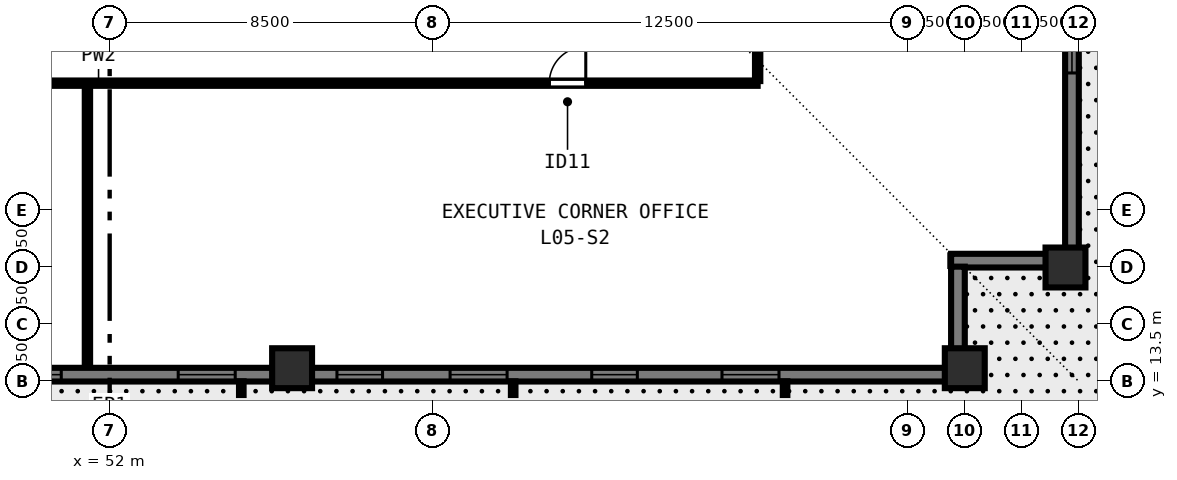
"""IFC4 building model, lengths in metres.
Left out: names, types, materials, properties, quantities, classifications, styles, units other than length and angle.
Written with IfcOpenShell. Run it as: python <this file> out.ifc"""

import sys

from ifc_helpers import new_model, si_unit, direction, frame, frame_2d, origin, origin_2d, place, context, subcontext, project, spatial, rectangle, extrude, element, fill, save


model = new_model("IFC4")
c1 = context("Model", 3, precision=1e-05, world=origin(), true_north=direction((0.0, 1.0)))
c2 = subcontext(c1, "Body", "Model", "MODEL_VIEW")
j1 = project(units=[si_unit("LENGTHUNIT", "METRE"), si_unit("PLANEANGLEUNIT", "RADIAN")], contexts=[c1])
p1 = place(None, origin())
s1 = spatial("IfcSite", under=j1, at=p1, CompositionType="ELEMENT")
p2 = place(p1, origin())
s2 = spatial("IfcBuilding", under=s1, at=p2, CompositionType="ELEMENT")
p3 = place(p2, frame((0.0, 0.0, 23.5)))
s3 = spatial("IfcBuildingStorey", under=s2, at=p3, CompositionType="ELEMENT", Elevation=23.5)
for number, where, z_axis, x_axis in (
    (1, (56.8, 13.85, 0.0), (0.0, 0.0, 1.0), (1.0, 0.0, 0.0)),
    (2, (74.5, 13.85, 0.0), (0.0, 0.0, 1.0), (1.0, 0.0, 0.0)),
    (3, (77.15, 16.5, 0.0), (0.0, 0.0, 1.0), (0.0, 1.0, 0.0)),
):
    element("IfcColumn", number, at=place(p3, frame(where, z_axis=z_axis, x_axis=x_axis)), inside=s3, PredefinedType="COLUMN", context=c2, shape_type="SweptSolid", body=[
        extrude(rectangle(XDim=1.05, YDim=1.05, at=origin_2d()), origin(), (0.0, 0.0, 1.0), 3.5),
    ])
p4 = place(p3, frame((77.32, 61.5, 0.0), z_axis=(0.0, 0.0, 1.0), x_axis=(0.0, -1.0, 0.0)))
e4 = element("IfcWall", 4, at=p4, inside=s3, PredefinedType="SOLIDWALL", context=c2, shape_type="SweptSolid", body=[
    extrude(rectangle(XDim=44.662, YDim=0.36, at=frame_2d((22.331, 0.0))), origin(), (0.0, 0.0, 1.0), 3.28),
])
p5 = place(p4, frame((4.78, 0.0, 0.8)))
e5 = element("IfcOpeningElement", 5, at=p5, cuts=e4, PredefinedType="OPENING", context=c2, shape_type="SweptSolid", body=[
    extrude(rectangle(XDim=1.5, YDim=1.544, at=frame_2d((0.75, 0.772))), frame((0.0, 0.19, 0.0), z_axis=(0.0, -1.0, 0.0), x_axis=(1.0, 0.0, 0.0)), (0.0, 0.0, 1.0), 0.38),
])
p6 = place(p4, frame((8.29, 0.0, 0.8)))
e6 = element("IfcOpeningElement", 6, at=p6, cuts=e4, PredefinedType="OPENING", context=c2, shape_type="SweptSolid", body=[
    extrude(rectangle(XDim=1.2, YDim=1.544, at=frame_2d((0.6, 0.772))), frame((0.0, 0.19, 0.0), z_axis=(0.0, -1.0, 0.0), x_axis=(1.0, 0.0, 0.0)), (0.0, 0.0, 1.0), 0.38),
])
p7 = place(p4, frame((11.5, 0.0, 0.8)))
e7 = element("IfcOpeningElement", 7, at=p7, cuts=e4, PredefinedType="OPENING", context=c2, shape_type="SweptSolid", body=[
    extrude(rectangle(XDim=1.5, YDim=1.544, at=frame_2d((0.75, 0.772))), frame((0.0, 0.19, 0.0), z_axis=(0.0, -1.0, 0.0), x_axis=(1.0, 0.0, 0.0)), (0.0, 0.0, 1.0), 0.38),
])
p8 = place(p4, frame((15.01, 0.0, 0.8)))
e8 = element("IfcOpeningElement", 8, at=p8, cuts=e4, PredefinedType="OPENING", context=c2, shape_type="SweptSolid", body=[
    extrude(rectangle(XDim=1.2, YDim=1.544, at=frame_2d((0.6, 0.772))), frame((0.0, 0.19, 0.0), z_axis=(0.0, -1.0, 0.0), x_axis=(1.0, 0.0, 0.0)), (0.0, 0.0, 1.0), 0.38),
])
p9 = place(p4, frame((18.671, 0.0, 0.8)))
e9 = element("IfcOpeningElement", 9, at=p9, cuts=e4, PredefinedType="OPENING", context=c2, shape_type="SweptSolid", body=[
    extrude(rectangle(XDim=1.5, YDim=1.544, at=frame_2d((0.75, 0.772))), frame((0.0, 0.19, 0.0), z_axis=(0.0, -1.0, 0.0), x_axis=(1.0, 0.0, 0.0)), (0.0, 0.0, 1.0), 0.38),
])
p10 = place(p4, frame((22.581, 0.0, 0.8)))
e10 = element("IfcOpeningElement", 10, at=p10, cuts=e4, PredefinedType="OPENING", context=c2, shape_type="SweptSolid", body=[
    extrude(rectangle(XDim=1.2, YDim=1.544, at=frame_2d((0.6, 0.772))), frame((0.0, 0.19, 0.0), z_axis=(0.0, -1.0, 0.0), x_axis=(1.0, 0.0, 0.0)), (0.0, 0.0, 1.0), 0.38),
])
p11 = place(p4, frame((24.941, 0.0, 0.8)))
e11 = element("IfcOpeningElement", 11, at=p11, cuts=e4, PredefinedType="OPENING", context=c2, shape_type="SweptSolid", body=[
    extrude(rectangle(XDim=1.5, YDim=1.544, at=frame_2d((0.75, 0.772))), frame((0.0, 0.19, 0.0), z_axis=(0.0, -1.0, 0.0), x_axis=(1.0, 0.0, 0.0)), (0.0, 0.0, 1.0), 0.38),
])
p12 = place(p4, frame((28.451, 0.0, 0.8)))
e12 = element("IfcOpeningElement", 12, at=p12, cuts=e4, PredefinedType="OPENING", context=c2, shape_type="SweptSolid", body=[
    extrude(rectangle(XDim=1.2, YDim=1.544, at=frame_2d((0.6, 0.772))), frame((0.0, 0.19, 0.0), z_axis=(0.0, -1.0, 0.0), x_axis=(1.0, 0.0, 0.0)), (0.0, 0.0, 1.0), 0.38),
])
p13 = place(p4, frame((31.662, 0.0, 0.8)))
e13 = element("IfcOpeningElement", 13, at=p13, cuts=e4, PredefinedType="OPENING", context=c2, shape_type="SweptSolid", body=[
    extrude(rectangle(XDim=1.5, YDim=1.544, at=frame_2d((0.75, 0.772))), frame((0.0, 0.19, 0.0), z_axis=(0.0, -1.0, 0.0), x_axis=(1.0, 0.0, 0.0)), (0.0, 0.0, 1.0), 0.38),
])
p14 = place(p4, frame((35.172, 0.0, 0.8)))
e14 = element("IfcOpeningElement", 14, at=p14, cuts=e4, PredefinedType="OPENING", context=c2, shape_type="SweptSolid", body=[
    extrude(rectangle(XDim=1.2, YDim=1.544, at=frame_2d((0.6, 0.772))), frame((0.0, 0.19, 0.0), z_axis=(0.0, -1.0, 0.0), x_axis=(1.0, 0.0, 0.0)), (0.0, 0.0, 1.0), 0.38),
])
p15 = place(p4, frame((38.382, 0.0, 0.8)))
e15 = element("IfcOpeningElement", 15, at=p15, cuts=e4, PredefinedType="OPENING", context=c2, shape_type="SweptSolid", body=[
    extrude(rectangle(XDim=1.5, YDim=1.544, at=frame_2d((0.75, 0.772))), frame((0.0, 0.19, 0.0), z_axis=(0.0, -1.0, 0.0), x_axis=(1.0, 0.0, 0.0)), (0.0, 0.0, 1.0), 0.38),
])
p16 = place(p3, frame((77.5, 16.68, 0.0), z_axis=(0.0, 0.0, 1.0), x_axis=(-1.0, 0.0, 0.0)))
e16 = element("IfcWall", 16, at=p16, inside=s3, PredefinedType="SOLIDWALL", context=c2, shape_type="SweptSolid", body=[
    extrude(rectangle(XDim=3.36, YDim=0.36, at=frame_2d((1.68, 0.0))), origin(), (0.0, 0.0, 1.0), 3.28),
])
p17 = place(p3, frame((74.32, 16.522, 0.0), z_axis=(0.0, 0.0, 1.0), x_axis=(0.0, -1.0, 0.0)))
e17 = element("IfcWall", 17, at=p17, inside=s3, PredefinedType="SOLIDWALL", context=c2, shape_type="SweptSolid", body=[
    extrude(rectangle(XDim=2.684, YDim=0.36, at=frame_2d((1.342, 0.0))), origin(), (0.0, 0.0, 1.0), 3.28),
])
p18 = place(p3, frame((74.5, 13.68, 0.0), z_axis=(0.0, 0.0, 1.0), x_axis=(-1.0, 0.0, 0.0)))
e18 = element("IfcWall", 18, at=p18, inside=s3, PredefinedType="SOLIDWALL", context=c2, shape_type="SweptSolid", body=[
    extrude(rectangle(XDim=29.162, YDim=0.36, at=frame_2d((14.581, 0.0))), origin(), (0.0, 0.0, 1.0), 3.28),
])
p19 = place(p18, frame((4.888, 0.0, 0.8)))
e19 = element("IfcOpeningElement", 19, at=p19, cuts=e18, PredefinedType="OPENING", context=c2, shape_type="SweptSolid", body=[
    extrude(rectangle(XDim=1.5, YDim=1.544, at=frame_2d((0.75, 0.772))), frame((0.0, 0.19, 0.0), z_axis=(0.0, -1.0, 0.0), x_axis=(1.0, 0.0, 0.0)), (0.0, 0.0, 1.0), 0.38),
])
p20 = place(p18, frame((8.615, 0.0, 0.8)))
e20 = element("IfcOpeningElement", 20, at=p20, cuts=e18, PredefinedType="OPENING", context=c2, shape_type="SweptSolid", body=[
    extrude(rectangle(XDim=1.2, YDim=1.544, at=frame_2d((0.6, 0.772))), frame((0.0, 0.19, 0.0), z_axis=(0.0, -1.0, 0.0), x_axis=(1.0, 0.0, 0.0)), (0.0, 0.0, 1.0), 0.38),
])
p21 = place(p18, frame((12.042, 0.0, 0.8)))
e21 = element("IfcOpeningElement", 21, at=p21, cuts=e18, PredefinedType="OPENING", context=c2, shape_type="SweptSolid", body=[
    extrude(rectangle(XDim=1.5, YDim=1.544, at=frame_2d((0.75, 0.772))), frame((0.0, 0.19, 0.0), z_axis=(0.0, -1.0, 0.0), x_axis=(1.0, 0.0, 0.0)), (0.0, 0.0, 1.0), 0.38),
])
p22 = place(p18, frame((15.32, 0.0, 0.8)))
e22 = element("IfcOpeningElement", 22, at=p22, cuts=e18, PredefinedType="OPENING", context=c2, shape_type="SweptSolid", body=[
    extrude(rectangle(XDim=1.2, YDim=1.544, at=frame_2d((0.6, 0.772))), frame((0.0, 0.19, 0.0), z_axis=(0.0, -1.0, 0.0), x_axis=(1.0, 0.0, 0.0)), (0.0, 0.0, 1.0), 0.38),
])
p23 = place(p18, frame((19.197, 0.0, 0.8)))
e23 = element("IfcOpeningElement", 23, at=p23, cuts=e18, PredefinedType="OPENING", context=c2, shape_type="SweptSolid", body=[
    extrude(rectangle(XDim=1.5, YDim=1.544, at=frame_2d((0.75, 0.772))), frame((0.0, 0.19, 0.0), z_axis=(0.0, -1.0, 0.0), x_axis=(1.0, 0.0, 0.0)), (0.0, 0.0, 1.0), 0.38),
])
p24 = place(p18, frame((23.773, 0.0, 0.8)))
e24 = element("IfcOpeningElement", 24, at=p24, cuts=e18, PredefinedType="OPENING", context=c2, shape_type="SweptSolid", body=[
    extrude(rectangle(XDim=1.2, YDim=1.544, at=frame_2d((0.6, 0.772))), frame((0.0, 0.19, 0.0), z_axis=(0.0, -1.0, 0.0), x_axis=(1.0, 0.0, 0.0)), (0.0, 0.0, 1.0), 0.38),
])
p25 = place(p3, frame((34.95, 21.35, 0.0), z_axis=(0.0, 0.0, 1.0), x_axis=(1.0, 0.0, 0.0)))
e25 = element("IfcWall", 25, at=p25, inside=s3, PredefinedType="PARTITIONING", context=c2, shape_type="SweptSolid", body=[
    extrude(rectangle(XDim=34.1, YDim=0.14, at=frame_2d((17.05, 0.0))), origin(), (0.0, 0.0, 1.0), 3.28),
])
p26 = place(p25, frame((3.938, 0.0, 0.0)))
e26 = element("IfcOpeningElement", 26, at=p26, cuts=e25, PredefinedType="OPENING", context=c2, shape_type="SweptSolid", body=[
    extrude(rectangle(XDim=0.96, YDim=2.12, at=frame_2d((0.48, 1.06))), frame((0.0, 0.08, 0.0), z_axis=(0.0, -1.0, 0.0), x_axis=(1.0, 0.0, 0.0)), (0.0, 0.0, 1.0), 0.16),
])
p27 = place(p25, frame((28.617, 0.0, 0.0)))
e27 = element("IfcOpeningElement", 27, at=p27, cuts=e25, PredefinedType="OPENING", context=c2, shape_type="SweptSolid", body=[
    extrude(rectangle(XDim=0.96, YDim=2.12, at=frame_2d((0.48, 1.06))), frame((0.0, 0.08, 0.0), z_axis=(0.0, -1.0, 0.0), x_axis=(1.0, 0.0, 0.0)), (0.0, 0.0, 1.0), 0.16),
])
p28 = place(p3, frame((69.05, 21.405, 0.0), z_axis=(0.0, 0.0, 1.0), x_axis=(0.0, 1.0, 0.0)))
e28 = element("IfcWall", 28, at=p28, inside=s3, PredefinedType="PARTITIONING", context=c2, shape_type="SweptSolid", body=[
    extrude(rectangle(XDim=35.19, YDim=0.14, at=frame_2d((17.595, 0.0))), origin(), (0.0, 0.0, 1.0), 3.28),
])
p29 = place(p28, frame((8.545, 0.0, 0.0)))
e29 = element("IfcOpeningElement", 29, at=p29, cuts=e28, PredefinedType="OPENING", context=c2, shape_type="SweptSolid", body=[
    extrude(rectangle(XDim=0.96, YDim=2.12, at=frame_2d((0.48, 1.06))), frame((0.0, 0.08, 0.0), z_axis=(0.0, -1.0, 0.0), x_axis=(1.0, 0.0, 0.0)), (0.0, 0.0, 1.0), 0.16),
])
p30 = place(p28, frame((26.095, 0.0, 0.0)))
e30 = element("IfcOpeningElement", 30, at=p30, cuts=e28, PredefinedType="OPENING", context=c2, shape_type="SweptSolid", body=[
    extrude(rectangle(XDim=0.96, YDim=2.12, at=frame_2d((0.48, 1.06))), frame((0.0, 0.08, 0.0), z_axis=(0.0, -1.0, 0.0), x_axis=(1.0, 0.0, 0.0)), (0.0, 0.0, 1.0), 0.16),
])
p31 = place(p3, frame((51.415, 13.92, 0.0), z_axis=(0.0, 0.0, 1.0), x_axis=(0.0, 1.0, 0.0)))
e31 = element("IfcWall", 31, at=p31, inside=s3, PredefinedType="PARTITIONING", context=c2, shape_type="SweptSolid", body=[
    extrude(rectangle(XDim=7.33, YDim=0.14, at=frame_2d((3.665, 0.0))), origin(), (0.0, 0.0, 1.0), 2.849),
])
p32 = place(p15, origin())
e32 = element("IfcWindow", 32, at=p32, inside=s3, PartitioningType="SINGLE_PANEL", PredefinedType="WINDOW", context=c2, shape_type="SweptSolid", body=[
    extrude(rectangle(XDim=1.5, YDim=1.544, at=frame_2d((0.75, 0.772))), frame((0.0, -0.05, 0.0), z_axis=(0.0, -1.0, 0.0), x_axis=(1.0, 0.0, 0.0)), (0.0, 0.0, 1.0), 0.06),
])
fill(e15, e32)
p33 = place(p19, origin())
e33 = element("IfcWindow", 33, at=p33, inside=s3, PartitioningType="SINGLE_PANEL", PredefinedType="WINDOW", context=c2, shape_type="SweptSolid", body=[
    extrude(rectangle(XDim=1.5, YDim=1.544, at=frame_2d((0.75, 0.772))), frame((0.0, -0.05, 0.0), z_axis=(0.0, -1.0, 0.0), x_axis=(1.0, 0.0, 0.0)), (0.0, 0.0, 1.0), 0.06),
])
fill(e19, e33)
p34 = place(p20, origin())
e34 = element("IfcWindow", 34, at=p34, inside=s3, PartitioningType="SINGLE_PANEL", PredefinedType="WINDOW", context=c2, shape_type="SweptSolid", body=[
    extrude(rectangle(XDim=1.2, YDim=1.544, at=frame_2d((0.6, 0.772))), frame((0.0, -0.05, 0.0), z_axis=(0.0, -1.0, 0.0), x_axis=(1.0, 0.0, 0.0)), (0.0, 0.0, 1.0), 0.06),
])
fill(e20, e34)
p35 = place(p21, origin())
e35 = element("IfcWindow", 35, at=p35, inside=s3, PartitioningType="SINGLE_PANEL", PredefinedType="WINDOW", context=c2, shape_type="SweptSolid", body=[
    extrude(rectangle(XDim=1.5, YDim=1.544, at=frame_2d((0.75, 0.772))), frame((0.0, -0.05, 0.0), z_axis=(0.0, -1.0, 0.0), x_axis=(1.0, 0.0, 0.0)), (0.0, 0.0, 1.0), 0.06),
])
fill(e21, e35)
p36 = place(p22, origin())
e36 = element("IfcWindow", 36, at=p36, inside=s3, PartitioningType="SINGLE_PANEL", PredefinedType="WINDOW", context=c2, shape_type="SweptSolid", body=[
    extrude(rectangle(XDim=1.2, YDim=1.544, at=frame_2d((0.6, 0.772))), frame((0.0, -0.05, 0.0), z_axis=(0.0, -1.0, 0.0), x_axis=(1.0, 0.0, 0.0)), (0.0, 0.0, 1.0), 0.06),
])
fill(e22, e36)
p37 = place(p23, origin())
e37 = element("IfcWindow", 37, at=p37, inside=s3, PartitioningType="SINGLE_PANEL", PredefinedType="WINDOW", context=c2, shape_type="SweptSolid", body=[
    extrude(rectangle(XDim=1.5, YDim=1.544, at=frame_2d((0.75, 0.772))), frame((0.0, -0.05, 0.0), z_axis=(0.0, -1.0, 0.0), x_axis=(1.0, 0.0, 0.0)), (0.0, 0.0, 1.0), 0.06),
])
fill(e23, e37)
p38 = place(p24, origin())
e38 = element("IfcWindow", 38, at=p38, inside=s3, PartitioningType="SINGLE_PANEL", PredefinedType="WINDOW", context=c2, shape_type="SweptSolid", body=[
    extrude(rectangle(XDim=1.2, YDim=1.544, at=frame_2d((0.6, 0.772))), frame((0.0, -0.05, 0.0), z_axis=(0.0, -1.0, 0.0), x_axis=(1.0, 0.0, 0.0)), (0.0, 0.0, 1.0), 0.06),
])
fill(e24, e38)
p39 = place(p27, origin())
e39 = element("IfcDoor", 39, at=p39, inside=s3, OperationType="SINGLE_SWING_RIGHT", PredefinedType="DOOR", context=c2, shape_type="SweptSolid", body=[
    extrude(rectangle(XDim=0.96, YDim=2.12, at=frame_2d((0.48, 1.06))), frame((0.0, 0.025, 0.0), z_axis=(0.0, -1.0, 0.0), x_axis=(1.0, 0.0, 0.0)), (0.0, 0.0, 1.0), 0.05),
])
fill(e27, e39)
save(model, sys.argv[1])
